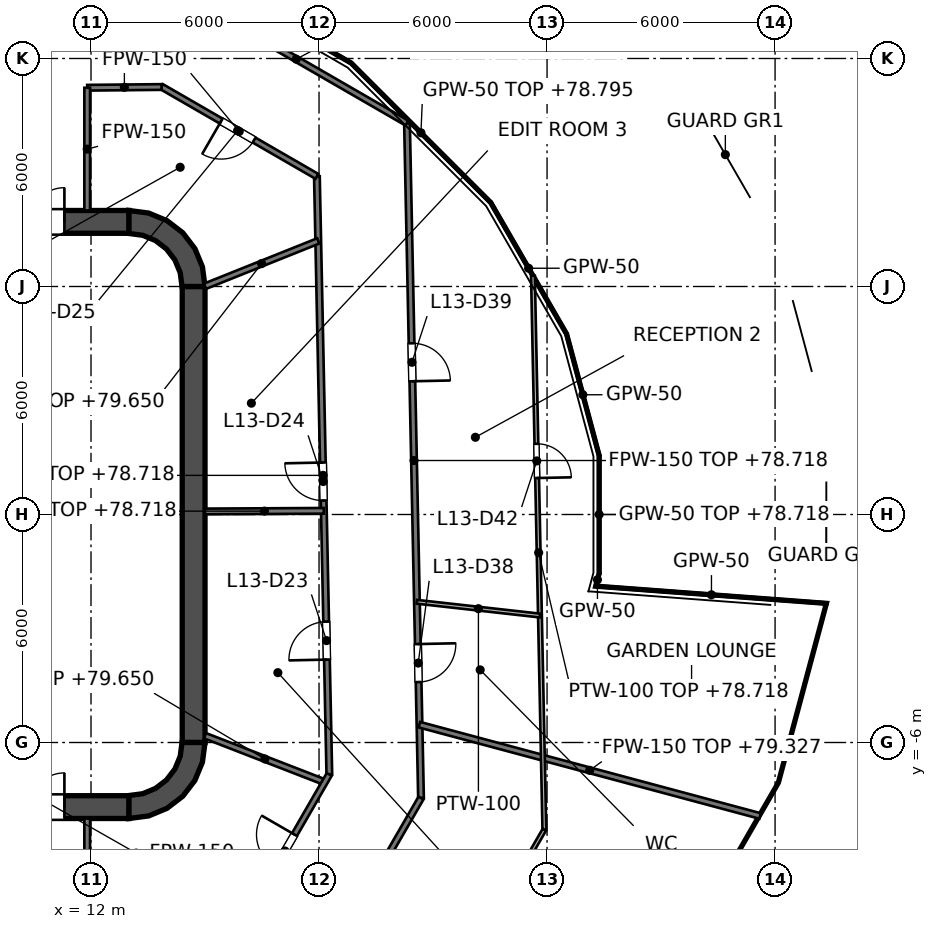
"""IFC4 building model, lengths in metres.
Left out: names, types, materials, properties, quantities, classifications, styles, units other than length and angle.
Written with IfcOpenShell. Run it as: python <this file> out.ifc"""

import sys

from ifc_helpers import new_model, si_unit, direction, frame, frame_2d, origin, place, context, subcontext, project, spatial, polyline, rectangle, outline, extrude, element, fill, save


model = new_model("IFC4")
c1 = context("Model", 3, precision=1e-05, world=origin(), true_north=direction((0.0, 1.0)))
c2 = subcontext(c1, "Body", "Model", "MODEL_VIEW")
j1 = project(units=[si_unit("LENGTHUNIT", "METRE"), si_unit("PLANEANGLEUNIT", "RADIAN")], contexts=[c1])
p1 = place(None, origin())
s1 = spatial("IfcSite", under=j1, at=p1, CompositionType="ELEMENT")
p2 = place(p1, origin())
s2 = spatial("IfcBuilding", under=s1, at=p2, CompositionType="ELEMENT")
p3 = place(p2, frame((0.0, 0.0, 75.6)))
s3 = spatial("IfcBuildingStorey", under=s2, at=p3, CompositionType="ELEMENT", Elevation=75.6)
p4 = place(p3, frame((-13.0, 7.7, 0.0), z_axis=(0.0, 0.0, 1.0), x_axis=(1.0, 0.0, 0.0)))
e1 = element("IfcWall", 1, at=p4, inside=s3, PredefinedType="SHEAR", context=c2, shape_type="SweptSolid", body=[
    extrude(rectangle(XDim=26.0, YDim=0.6, at=frame_2d((13.0, 0.0))), origin(), (0.0, 0.0, 1.0), 4.2),
])
p5 = place(p4, frame((1.7, 0.0, 0.0)))
e2 = element("IfcOpeningElement", 2, at=p5, cuts=e1, PredefinedType="OPENING", context=c2, shape_type="SweptSolid", body=[
    extrude(rectangle(XDim=1.8, YDim=2.1, at=frame_2d((0.9, 1.05))), frame((0.0, 0.3, 0.0), z_axis=(0.0, -1.0, 0.0), x_axis=(1.0, 0.0, 0.0)), (0.0, 0.0, 1.0), 0.6),
])
p6 = place(p4, frame((22.5, 0.0, 0.0)))
e3 = element("IfcOpeningElement", 3, at=p6, cuts=e1, PredefinedType="OPENING", context=c2, shape_type="SweptSolid", body=[
    extrude(rectangle(XDim=1.8, YDim=2.1, at=frame_2d((0.9, 1.05))), frame((0.0, 0.3, 0.0), z_axis=(0.0, -1.0, 0.0), x_axis=(1.0, 0.0, 0.0)), (0.0, 0.0, 1.0), 0.6),
])
p7 = place(p3, frame((-13.0, -7.7, 0.0), z_axis=(0.0, 0.0, 1.0), x_axis=(1.0, 0.0, 0.0)))
e4 = element("IfcWall", 4, at=p7, inside=s3, PredefinedType="SHEAR", context=c2, shape_type="SweptSolid", body=[
    extrude(rectangle(XDim=26.0, YDim=0.6, at=frame_2d((13.0, 0.0))), origin(), (0.0, 0.0, 1.0), 4.2),
])
p8 = place(p7, frame((1.7, 0.0, 0.0)))
e5 = element("IfcOpeningElement", 5, at=p8, cuts=e4, PredefinedType="OPENING", context=c2, shape_type="SweptSolid", body=[
    extrude(rectangle(XDim=1.8, YDim=2.1, at=frame_2d((0.9, 1.05))), frame((0.0, 0.3, 0.0), z_axis=(0.0, -1.0, 0.0), x_axis=(1.0, 0.0, 0.0)), (0.0, 0.0, 1.0), 0.6),
])
p9 = place(p7, frame((22.5, 0.0, 0.0)))
e6 = element("IfcOpeningElement", 6, at=p9, cuts=e4, PredefinedType="OPENING", context=c2, shape_type="SweptSolid", body=[
    extrude(rectangle(XDim=1.8, YDim=2.1, at=frame_2d((0.9, 1.05))), frame((0.0, 0.3, 0.0), z_axis=(0.0, -1.0, 0.0), x_axis=(1.0, 0.0, 0.0)), (0.0, 0.0, 1.0), 0.6),
])
p10 = place(p3, frame((14.7, -6.0, 0.0), z_axis=(0.0, 0.0, 1.0), x_axis=(0.0, 1.0, 0.0)))
e7 = element("IfcWall", 7, at=p10, inside=s3, PredefinedType="SHEAR", context=c2, shape_type="SweptSolid", body=[
    extrude(rectangle(XDim=12.0, YDim=0.6, at=frame_2d((6.0, 0.0))), origin(), (0.0, 0.0, 1.0), 4.2),
])
p11 = place(p3, origin())
e8 = element("IfcWall", 8, at=p11, inside=s3, PredefinedType="SHEAR", context=c2, shape_type="SweptSolid", body=[
    extrude(outline(polyline([(13.0, 8.0), (13.0, 7.395), (13.361, 7.347), (13.698, 7.208), (13.986, 6.986), (14.208, 6.698), (14.347, 6.361), (14.395, 6.0), (15.0, 6.0), (14.932, 6.518), (14.732, 7.0), (14.414, 7.414), (14.0, 7.732), (13.518, 7.932), (13.0, 8.0)])), origin(), (0.0, 0.0, 1.0), 4.2),
])
e9 = element("IfcWall", 9, at=p11, inside=s3, PredefinedType="SHEAR", context=c2, shape_type="SweptSolid", body=[
    extrude(outline(polyline([(15.0, -6.0), (14.395, -6.0), (14.347, -6.361), (14.208, -6.698), (13.986, -6.986), (13.698, -7.208), (13.361, -7.347), (13.0, -7.395), (13.0, -8.0), (13.518, -7.932), (14.0, -7.732), (14.414, -7.414), (14.732, -7.0), (14.932, -6.518), (15.0, -6.0)])), origin(), (0.0, 0.0, 1.0), 4.2),
])
p12 = place(p3, frame((11.8, -7.4, 0.0), z_axis=(0.0, 0.0, 1.0), x_axis=(0.0, 1.0, 0.0)))
e10 = element("IfcWall", 10, at=p12, inside=s3, PredefinedType="SOLIDWALL", context=c2, shape_type="SweptSolid", body=[
    extrude(rectangle(XDim=14.8, YDim=0.4, at=frame_2d((7.4, 0.0))), origin(), (0.0, 0.0, 1.0), 4.05),
])
p13 = place(p12, frame((11.2, 0.0, 0.0)))
e11 = element("IfcOpeningElement", 11, at=p13, cuts=e10, PredefinedType="OPENING", context=c2, shape_type="SweptSolid", body=[
    extrude(rectangle(XDim=1.1, YDim=2.1, at=frame_2d((0.55, 1.05))), frame((0.0, 0.2, 0.0), z_axis=(0.0, -1.0, 0.0), x_axis=(1.0, 0.0, 0.0)), (0.0, 0.0, 1.0), 0.4),
])
p14 = place(p12, frame((8.3, 0.0, 0.0)))
e12 = element("IfcOpeningElement", 12, at=p14, cuts=e10, PredefinedType="OPENING", context=c2, shape_type="SweptSolid", body=[
    extrude(rectangle(XDim=1.1, YDim=2.1, at=frame_2d((0.55, 1.05))), frame((0.0, 0.2, 0.0), z_axis=(0.0, -1.0, 0.0), x_axis=(1.0, 0.0, 0.0)), (0.0, 0.0, 1.0), 0.4),
])
p15 = place(p12, frame((5.4, 0.0, 0.0)))
e13 = element("IfcOpeningElement", 13, at=p15, cuts=e10, PredefinedType="OPENING", context=c2, shape_type="SweptSolid", body=[
    extrude(rectangle(XDim=1.1, YDim=2.1, at=frame_2d((0.55, 1.05))), frame((0.0, 0.2, 0.0), z_axis=(0.0, -1.0, 0.0), x_axis=(1.0, 0.0, 0.0)), (0.0, 0.0, 1.0), 0.4),
])
p16 = place(p12, frame((13.552, 0.0, 0.0)))
e14 = element("IfcOpeningElement", 14, at=p16, cuts=e10, PredefinedType="OPENING", context=c2, shape_type="SweptSolid", body=[
    extrude(rectangle(XDim=0.9, YDim=2.1, at=frame_2d((0.45, 1.05))), frame((0.0, 0.2, 0.0), z_axis=(0.0, -1.0, 0.0), x_axis=(1.0, 0.0, 0.0)), (0.0, 0.0, 1.0), 0.4),
])
p17 = place(p12, frame((0.347, 0.0, 0.0)))
e15 = element("IfcOpeningElement", 15, at=p17, cuts=e10, PredefinedType="OPENING", context=c2, shape_type="SweptSolid", body=[
    extrude(rectangle(XDim=0.9, YDim=2.1, at=frame_2d((0.45, 1.05))), frame((0.0, 0.2, 0.0), z_axis=(0.0, -1.0, 0.0), x_axis=(1.0, 0.0, 0.0)), (0.0, 0.0, 1.0), 0.4),
])
e16 = element("IfcWall", 16, at=p11, inside=s3, PredefinedType="SOLIDWALL", context=c2, shape_type="SweptSolid", body=[
    extrude(outline(polyline([(12.0, -5.675), (12.0, -5.925), (14.15, -5.925), (14.4, -5.925), (14.4, -5.675), (14.4, -3.025), (14.4, -2.775), (14.4, -0.125), (14.4, 0.125), (14.4, 2.775), (14.4, 3.025), (14.4, 5.675), (14.4, 5.925), (14.15, 5.925), (12.0, 5.925), (12.0, 5.675), (14.15, 5.675), (14.15, 3.025), (12.0, 3.025), (12.0, 2.775), (14.15, 2.775), (14.15, 0.125), (12.0, 0.125), (12.0, -0.125), (14.15, -0.125), (14.15, -2.775), (12.0, -2.775), (12.0, -3.025), (14.15, -3.025), (14.15, -5.675), (12.0, -5.675)])), origin(), (0.0, 0.0, 1.0), 4.05),
])
p18 = place(p3, frame((17.944, 8.899, 0.0), z_axis=(0.0, 0.0, 1.0), x_axis=(0.020766159807, -0.999784360053, 0.0)))
e17 = element("IfcWall", 17, at=p18, inside=s3, PredefinedType="PARTITIONING", context=c2, shape_type="SweptSolid", body=[
    extrude(rectangle(XDim=15.742, YDim=0.15, at=frame_2d((7.871, 0.0))), origin(), (0.0, 0.0, 1.0), 3.118),
])
p19 = place(p18, frame((11.72, 0.0, 0.0)))
e18 = element("IfcOpeningElement", 18, at=p19, cuts=e17, PredefinedType="OPENING", context=c2, shape_type="SweptSolid", body=[
    extrude(rectangle(XDim=1.0, YDim=2.1, at=frame_2d((0.5, 1.05))), frame((0.0, 0.075, 0.0), z_axis=(0.0, -1.0, 0.0), x_axis=(1.0, 0.0, 0.0)), (0.0, 0.0, 1.0), 0.15),
])
p20 = place(p18, frame((7.533, 0.0, 0.0)))
e19 = element("IfcOpeningElement", 19, at=p20, cuts=e17, PredefinedType="OPENING", context=c2, shape_type="SweptSolid", body=[
    extrude(rectangle(XDim=1.0, YDim=2.1, at=frame_2d((0.5, 1.05))), frame((0.0, 0.075, 0.0), z_axis=(0.0, -1.0, 0.0), x_axis=(1.0, 0.0, 0.0)), (0.0, 0.0, 1.0), 0.15),
])
p21 = place(p3, frame((20.314, 10.301, 0.0), z_axis=(0.0, 0.0, 1.0), x_axis=(0.020779303351, -0.999784086967, 0.0)))
e20 = element("IfcWall", 20, at=p21, inside=s3, PredefinedType="PARTITIONING", context=c2, shape_type="SweptSolid", body=[
    extrude(rectangle(XDim=17.765, YDim=0.15, at=frame_2d((8.882, 0.0))), origin(), (0.0, 0.0, 1.0), 3.118),
])
p22 = place(p21, frame((13.714, 0.0, 0.0)))
e21 = element("IfcOpeningElement", 21, at=p22, cuts=e20, PredefinedType="OPENING", context=c2, shape_type="SweptSolid", body=[
    extrude(rectangle(XDim=1.0, YDim=2.1, at=frame_2d((0.5, 1.05))), frame((0.0, 0.075, 0.0), z_axis=(0.0, -1.0, 0.0), x_axis=(1.0, 0.0, 0.0)), (0.0, 0.0, 1.0), 0.15),
])
p23 = place(p21, frame((5.797, 0.0, 0.0)))
e22 = element("IfcOpeningElement", 22, at=p23, cuts=e20, PredefinedType="OPENING", context=c2, shape_type="SweptSolid", body=[
    extrude(rectangle(XDim=1.0, YDim=2.1, at=frame_2d((0.5, 1.05))), frame((0.0, 0.075, 0.0), z_axis=(0.0, -1.0, 0.0), x_axis=(1.0, 0.0, 0.0)), (0.0, 0.0, 1.0), 0.15),
])
p24 = place(p3, frame((13.856, 11.259, 0.0), z_axis=(0.0, 0.0, 1.0), x_axis=(0.865971100816, -0.500094043707, 0.0)))
e23 = element("IfcWall", 23, at=p24, inside=s3, PredefinedType="PARTITIONING", context=c2, shape_type="SweptSolid", body=[
    extrude(rectangle(XDim=4.72, YDim=0.15, at=frame_2d((2.36, 0.0))), origin(), (0.0, 0.0, 1.0), 3.195),
])
p25 = place(p24, frame((1.812, 0.0, 0.0)))
e24 = element("IfcOpeningElement", 24, at=p25, cuts=e23, PredefinedType="OPENING", context=c2, shape_type="SweptSolid", body=[
    extrude(rectangle(XDim=1.0, YDim=2.1, at=frame_2d((0.5, 1.05))), frame((0.0, 0.075, 0.0), z_axis=(0.0, -1.0, 0.0), x_axis=(1.0, 0.0, 0.0)), (0.0, 0.0, 1.0), 0.15),
])
p26 = place(p3, frame((14.488, 13.665, 0.0), z_axis=(0.0, 0.0, 1.0), x_axis=(0.865978916812, -0.500080509155, 0.0)))
e25 = element("IfcWall", 25, at=p26, inside=s3, PredefinedType="PARTITIONING", context=c2, shape_type="SweptSolid", body=[
    extrude(rectangle(XDim=6.729, YDim=0.15, at=frame_2d((3.364, 0.0))), origin(), (0.0, 0.0, 1.0), 3.195),
])
p27 = place(p26, frame((0.803, 0.0, 0.0)))
e26 = element("IfcOpeningElement", 26, at=p27, cuts=e25, PredefinedType="OPENING", context=c2, shape_type="SweptSolid", body=[
    extrude(rectangle(XDim=1.0, YDim=2.1, at=frame_2d((0.5, 1.05))), frame((0.0, 0.075, 0.0), z_axis=(0.0, -1.0, 0.0), x_axis=(1.0, 0.0, 0.0)), (0.0, 0.0, 1.0), 0.15),
])
p28 = place(p3, frame((15.0, -5.822, 0.0), z_axis=(0.0, 0.0, 1.0), x_axis=(0.932341922019, -0.36157784839, 0.0)))
e27 = element("IfcWall", 27, at=p28, inside=s3, PredefinedType="PARTITIONING", context=c2, shape_type="SweptSolid", body=[
    extrude(rectangle(XDim=3.379, YDim=0.15, at=frame_2d((1.689, 0.0))), origin(), (0.0, 0.0, 1.0), 4.05),
])
p29 = place(p3, frame((20.641, -5.531, 0.0), z_axis=(0.0, 0.0, 1.0), x_axis=(0.965912819534, -0.258867582095, 0.0)))
e28 = element("IfcWall", 28, at=p29, inside=s3, PredefinedType="PARTITIONING", context=c2, shape_type="SweptSolid", body=[
    extrude(rectangle(XDim=9.28, YDim=0.15, at=frame_2d((4.64, 0.0))), origin(), (0.0, 0.0, 1.0), 3.727),
])
p30 = place(p3, frame((15.0, 0.08, 0.0), z_axis=(0.0, 0.0, 1.0), x_axis=(0.999985888971, 0.005312425035, 0.0)))
e29 = element("IfcWall", 29, at=p30, inside=s3, PredefinedType="PARTITIONING", context=c2, shape_type="SweptSolid", body=[
    extrude(rectangle(XDim=3.125, YDim=0.15, at=frame_2d((1.562, 0.0))), origin(), (0.0, 0.0, 1.0), 3.118),
])
p31 = place(p3, frame((11.9, 11.23, 0.0), z_axis=(0.0, 0.0, 1.0), x_axis=(0.99995016583, 0.00998327883, 0.0)))
e30 = element("IfcWall", 30, at=p31, inside=s3, PredefinedType="PARTITIONING", context=c2, shape_type="SweptSolid", body=[
    extrude(rectangle(XDim=1.956, YDim=0.15, at=frame_2d((0.978, 0.0))), origin(), (0.0, 0.0, 1.0), 4.05),
])
p32 = place(p3, frame((14.999, 6.006, 0.0), z_axis=(0.0, 0.0, 1.0), x_axis=(0.928292988159, 0.371849604188, 0.0)))
e31 = element("IfcWall", 31, at=p32, inside=s3, PredefinedType="PARTITIONING", context=c2, shape_type="SweptSolid", body=[
    extrude(rectangle(XDim=3.21, YDim=0.15, at=frame_2d((1.605, 0.0))), origin(), (0.0, 0.0, 1.0), 4.05),
])
p33 = place(p3, frame((17.281, -13.35, 0.0), z_axis=(0.0, 0.0, 1.0), x_axis=(0.500235133997, 0.865889606541, 0.0)))
e32 = element("IfcWall", 32, at=p33, inside=s3, PredefinedType="PARTITIONING", context=c2, shape_type="SweptSolid", body=[
    extrude(rectangle(XDim=6.801, YDim=0.15, at=frame_2d((3.4, 0.0))), origin(), (0.0, 0.0, 1.0), 3.195),
])
p34 = place(p3, frame((15.892, -10.954, 0.0), z_axis=(0.0, 0.0, 1.0), x_axis=(0.50019540779, 0.865912555646, 0.0)))
e33 = element("IfcWall", 33, at=p34, inside=s3, PredefinedType="PARTITIONING", context=c2, shape_type="SweptSolid", body=[
    extrude(rectangle(XDim=4.751, YDim=0.15, at=frame_2d((2.375, 0.0))), origin(), (0.0, 0.0, 1.0), 3.195),
])
p35 = place(p34, frame((1.924, 0.0, 0.0)))
e34 = element("IfcOpeningElement", 34, at=p35, cuts=e33, PredefinedType="OPENING", context=c2, shape_type="SweptSolid", body=[
    extrude(rectangle(XDim=1.0, YDim=2.1, at=frame_2d((0.5, 1.05))), frame((0.0, 0.075, 0.0), z_axis=(0.0, -1.0, 0.0), x_axis=(1.0, 0.0, 0.0)), (0.0, 0.0, 1.0), 0.15),
])
p36 = place(p3, frame((11.9, -10.992, 0.0), z_axis=(0.0, 0.0, 1.0), x_axis=(0.0, 1.0, 0.0)))
e35 = element("IfcWall", 35, at=p36, inside=s3, PredefinedType="PARTITIONING", context=c2, shape_type="SweptSolid", body=[
    extrude(rectangle(XDim=2.992, YDim=0.15, at=frame_2d((1.496, 0.0))), origin(), (0.0, 0.0, 1.0), 3.195),
])
p37 = place(p3, frame((11.9, 8.0, 0.0), z_axis=(0.0, 0.0, 1.0), x_axis=(0.0, 1.0, 0.0)))
e36 = element("IfcWall", 36, at=p37, inside=s3, PredefinedType="PARTITIONING", context=c2, shape_type="SweptSolid", body=[
    extrude(rectangle(XDim=3.229, YDim=0.15, at=frame_2d((1.615, 0.0))), origin(), (0.0, 0.0, 1.0), 3.195),
])
p38 = place(p3, frame((24.513, 4.752, 0.0), z_axis=(0.0, 0.0, 1.0), x_axis=(0.258877201574, -0.965910241433, 0.0)))
e37 = element("IfcWall", 37, at=p38, inside=s3, PredefinedType="PARTITIONING", context=c2, shape_type="SweptSolid", body=[
    extrude(rectangle(XDim=3.315, YDim=0.05, at=frame_2d((1.657, 0.0))), origin(), (0.0, 0.0, 1.0), 3.127),
])
p39 = place(p3, frame((22.517, 8.209, 0.0), z_axis=(0.0, 0.0, 1.0), x_axis=(0.499987164874, -0.866032814021, 0.0)))
e38 = element("IfcWall", 38, at=p39, inside=s3, PredefinedType="PARTITIONING", context=c2, shape_type="SweptSolid", body=[
    extrude(rectangle(XDim=3.992, YDim=0.05, at=frame_2d((1.996, 0.0))), origin(), (0.0, 0.0, 1.0), 3.127),
])
p40 = place(p3, frame((18.846, 11.88, 0.0), z_axis=(0.0, 0.0, 1.0), x_axis=(0.707130293807, -0.707083267785, 0.0)))
e39 = element("IfcWall", 39, at=p40, inside=s3, PredefinedType="PARTITIONING", context=c2, shape_type="SweptSolid", body=[
    extrude(rectangle(XDim=5.192, YDim=0.05, at=frame_2d((2.596, 0.0))), origin(), (0.0, 0.0, 1.0), 3.195),
])
p41 = place(p3, frame((17.273, 12.789, 0.0), z_axis=(0.0, 0.0, 1.0), x_axis=(0.865784864345, -0.500416395285, 0.0)))
e40 = element("IfcWall", 40, at=p41, inside=s3, PredefinedType="PARTITIONING", context=c2, shape_type="SweptSolid", body=[
    extrude(rectangle(XDim=1.817, YDim=0.05, at=frame_2d((0.908, 0.0))), origin(), (0.0, 0.0, 1.0), 3.195),
])
p42 = place(p3, frame((25.281, -1.886, 0.0), z_axis=(0.0, 0.0, 1.0), x_axis=(0.997231640207, -0.074357620797, 0.0)))
e41 = element("IfcWall", 41, at=p42, inside=s3, PredefinedType="PARTITIONING", context=c2, shape_type="SweptSolid", body=[
    extrude(rectangle(XDim=6.107, YDim=0.05, at=frame_2d((3.053, 0.0))), origin(), (0.0, 0.0, 1.0), 3.127),
])
p43 = place(p3, frame((25.281, -1.886, 0.0), z_axis=(0.0, 0.0, 1.0), x_axis=(0.259016767744, 0.965872824976, 0.0)))
e42 = element("IfcWall", 42, at=p43, inside=s3, PredefinedType="PARTITIONING", context=c2, shape_type="SweptSolid", body=[
    extrude(rectangle(XDim=0.348, YDim=0.05, at=frame_2d((0.174, 0.0))), origin(), (0.0, 0.0, 1.0), 3.127),
])
p44 = place(p3, frame((25.371, -1.55, 0.0), z_axis=(0.0, 0.0, 1.0), x_axis=(0.0, 1.0, 0.0)))
e43 = element("IfcWall", 43, at=p44, inside=s3, PredefinedType="PARTITIONING", context=c2, shape_type="SweptSolid", body=[
    extrude(rectangle(XDim=3.1, YDim=0.05, at=frame_2d((1.55, 0.0))), origin(), (0.0, 0.0, 1.0), 3.118),
])
p45 = place(p3, frame((23.629, 6.283, 0.0), z_axis=(0.0, 0.0, 1.0), x_axis=(0.020596229696, -0.999787875163, 0.0)))
e44 = element("IfcWall", 44, at=p45, inside=s3, PredefinedType="PARTITIONING", context=c2, shape_type="SweptSolid", body=[
    extrude(rectangle(XDim=14.58, YDim=0.1, at=frame_2d((7.29, 0.0))), origin(), (0.0, 0.0, 1.0), 3.118),
])
p46 = place(p45, frame((4.424, 0.0, 0.0)))
e45 = element("IfcOpeningElement", 45, at=p46, cuts=e44, PredefinedType="OPENING", context=c2, shape_type="SweptSolid", body=[
    extrude(rectangle(XDim=0.9, YDim=2.1, at=frame_2d((0.45, 1.05))), frame((0.0, 0.05, 0.0), z_axis=(0.0, -1.0, 0.0), x_axis=(1.0, 0.0, 0.0)), (0.0, 0.0, 1.0), 0.1),
])
p47 = place(p3, frame((20.575, -2.297, 0.0), z_axis=(0.0, 0.0, 1.0), x_axis=(0.993815008467, -0.111048318069, 0.0)))
e46 = element("IfcWall", 46, at=p47, inside=s3, PredefinedType="PARTITIONING", context=c2, shape_type="SweptSolid", body=[
    extrude(rectangle(XDim=3.258, YDim=0.1, at=frame_2d((1.629, 0.0))), origin(), (0.0, 0.0, 1.0), 4.05),
])
p48 = place(p3, frame((19.157, -16.562, 0.0), z_axis=(0.0, 0.0, 1.0), x_axis=(0.499904728141, 0.866080402031, 0.0)))
e47 = element("IfcWall", 47, at=p48, inside=s3, PredefinedType="PARTITIONING", context=c2, shape_type="SweptSolid", body=[
    extrude(rectangle(XDim=9.546, YDim=0.1, at=frame_2d((4.773, 0.0))), origin(), (0.0, 0.0, 1.0), 3.195),
])
p49 = place(p13, origin())
e48 = element("IfcDoor", 48, at=p49, inside=s3, OperationType="DOUBLE_DOOR_SLIDING", PredefinedType="DOOR", context=c2, shape_type="SweptSolid", body=[
    extrude(rectangle(XDim=1.1, YDim=2.1, at=frame_2d((0.55, 1.05))), frame((0.0, 0.025, 0.0), z_axis=(0.0, -1.0, 0.0), x_axis=(1.0, 0.0, 0.0)), (0.0, 0.0, 1.0), 0.05),
])
fill(e11, e48)
p50 = place(p14, origin())
e49 = element("IfcDoor", 49, at=p50, inside=s3, OperationType="DOUBLE_DOOR_SLIDING", PredefinedType="DOOR", context=c2, shape_type="SweptSolid", body=[
    extrude(rectangle(XDim=1.1, YDim=2.1, at=frame_2d((0.55, 1.05))), frame((0.0, 0.025, 0.0), z_axis=(0.0, -1.0, 0.0), x_axis=(1.0, 0.0, 0.0)), (0.0, 0.0, 1.0), 0.05),
])
fill(e12, e49)
p51 = place(p15, origin())
e50 = element("IfcDoor", 50, at=p51, inside=s3, OperationType="DOUBLE_DOOR_SLIDING", PredefinedType="DOOR", context=c2, shape_type="SweptSolid", body=[
    extrude(rectangle(XDim=1.1, YDim=2.1, at=frame_2d((0.55, 1.05))), frame((0.0, 0.025, 0.0), z_axis=(0.0, -1.0, 0.0), x_axis=(1.0, 0.0, 0.0)), (0.0, 0.0, 1.0), 0.05),
])
fill(e13, e50)
p52 = place(p16, origin())
e51 = element("IfcDoor", 51, at=p52, inside=s3, OperationType="SINGLE_SWING_RIGHT", PredefinedType="DOOR", context=c2, shape_type="SweptSolid", body=[
    extrude(rectangle(XDim=0.9, YDim=2.1, at=frame_2d((0.45, 1.05))), frame((0.0, 0.025, 0.0), z_axis=(0.0, -1.0, 0.0), x_axis=(1.0, 0.0, 0.0)), (0.0, 0.0, 1.0), 0.05),
])
fill(e14, e51)
p53 = place(p17, origin())
e52 = element("IfcDoor", 52, at=p53, inside=s3, OperationType="SINGLE_SWING_RIGHT", PredefinedType="DOOR", context=c2, shape_type="SweptSolid", body=[
    extrude(rectangle(XDim=0.9, YDim=2.1, at=frame_2d((0.45, 1.05))), frame((0.0, 0.025, 0.0), z_axis=(0.0, -1.0, 0.0), x_axis=(1.0, 0.0, 0.0)), (0.0, 0.0, 1.0), 0.05),
])
fill(e15, e52)
p54 = place(p6, origin())
e53 = element("IfcDoor", 53, at=p54, inside=s3, OperationType="DOUBLE_DOOR_SINGLE_SWING", PredefinedType="DOOR", context=c2, shape_type="SweptSolid", body=[
    extrude(rectangle(XDim=1.8, YDim=2.1, at=frame_2d((0.9, 1.05))), frame((0.0, 0.025, 0.0), z_axis=(0.0, -1.0, 0.0), x_axis=(1.0, 0.0, 0.0)), (0.0, 0.0, 1.0), 0.05),
])
fill(e3, e53)
p55 = place(p9, origin())
e54 = element("IfcDoor", 54, at=p55, inside=s3, OperationType="DOUBLE_DOOR_SINGLE_SWING", PredefinedType="DOOR", context=c2, shape_type="SweptSolid", body=[
    extrude(rectangle(XDim=1.8, YDim=2.1, at=frame_2d((0.9, 1.05))), frame((0.0, 0.025, 0.0), z_axis=(0.0, -1.0, 0.0), x_axis=(1.0, 0.0, 0.0)), (0.0, 0.0, 1.0), 0.05),
])
fill(e6, e54)
p56 = place(p35, origin())
e55 = element("IfcDoor", 55, at=p56, inside=s3, OperationType="SINGLE_SWING_RIGHT", PredefinedType="DOOR", context=c2, shape_type="SweptSolid", body=[
    extrude(rectangle(XDim=1.0, YDim=2.1, at=frame_2d((0.5, 1.05))), frame((0.0, 0.025, 0.0), z_axis=(0.0, -1.0, 0.0), x_axis=(1.0, 0.0, 0.0)), (0.0, 0.0, 1.0), 0.05),
])
fill(e34, e55)
p57 = place(p19, origin())
e56 = element("IfcDoor", 56, at=p57, inside=s3, OperationType="SINGLE_SWING_RIGHT", PredefinedType="DOOR", context=c2, shape_type="SweptSolid", body=[
    extrude(rectangle(XDim=1.0, YDim=2.1, at=frame_2d((0.5, 1.05))), frame((0.0, 0.025, 0.0), z_axis=(0.0, -1.0, 0.0), x_axis=(1.0, 0.0, 0.0)), (0.0, 0.0, 1.0), 0.05),
])
fill(e18, e56)
p58 = place(p20, origin())
e57 = element("IfcDoor", 57, at=p58, inside=s3, OperationType="SINGLE_SWING_LEFT", PredefinedType="DOOR", context=c2, shape_type="SweptSolid", body=[
    extrude(rectangle(XDim=1.0, YDim=2.1, at=frame_2d((0.5, 1.05))), frame((0.0, 0.025, 0.0), z_axis=(0.0, -1.0, 0.0), x_axis=(1.0, 0.0, 0.0)), (0.0, 0.0, 1.0), 0.05),
])
fill(e19, e57)
p59 = place(p25, origin())
e58 = element("IfcDoor", 58, at=p59, inside=s3, OperationType="SINGLE_SWING_LEFT", PredefinedType="DOOR", context=c2, shape_type="SweptSolid", body=[
    extrude(rectangle(XDim=1.0, YDim=2.1, at=frame_2d((0.5, 1.05))), frame((0.0, 0.025, 0.0), z_axis=(0.0, -1.0, 0.0), x_axis=(1.0, 0.0, 0.0)), (0.0, 0.0, 1.0), 0.05),
])
fill(e24, e58)
p60 = place(p22, origin())
e59 = element("IfcDoor", 59, at=p60, inside=s3, OperationType="SINGLE_SWING_LEFT", PredefinedType="DOOR", context=c2, shape_type="SweptSolid", body=[
    extrude(rectangle(XDim=1.0, YDim=2.1, at=frame_2d((0.5, 1.05))), frame((0.0, 0.025, 0.0), z_axis=(0.0, -1.0, 0.0), x_axis=(1.0, 0.0, 0.0)), (0.0, 0.0, 1.0), 0.05),
])
fill(e21, e59)
p61 = place(p23, origin())
e60 = element("IfcDoor", 60, at=p61, inside=s3, OperationType="SINGLE_SWING_RIGHT", PredefinedType="DOOR", context=c2, shape_type="SweptSolid", body=[
    extrude(rectangle(XDim=1.0, YDim=2.1, at=frame_2d((0.5, 1.05))), frame((0.0, 0.025, 0.0), z_axis=(0.0, -1.0, 0.0), x_axis=(1.0, 0.0, 0.0)), (0.0, 0.0, 1.0), 0.05),
])
fill(e22, e60)
p62 = place(p46, origin())
e61 = element("IfcDoor", 61, at=p62, inside=s3, OperationType="SINGLE_SWING_RIGHT", PredefinedType="DOOR", context=c2, shape_type="SweptSolid", body=[
    extrude(rectangle(XDim=0.9, YDim=2.1, at=frame_2d((0.45, 1.05))), frame((0.0, 0.025, 0.0), z_axis=(0.0, -1.0, 0.0), x_axis=(1.0, 0.0, 0.0)), (0.0, 0.0, 1.0), 0.05),
])
fill(e45, e61)
save(model, sys.argv[1])
